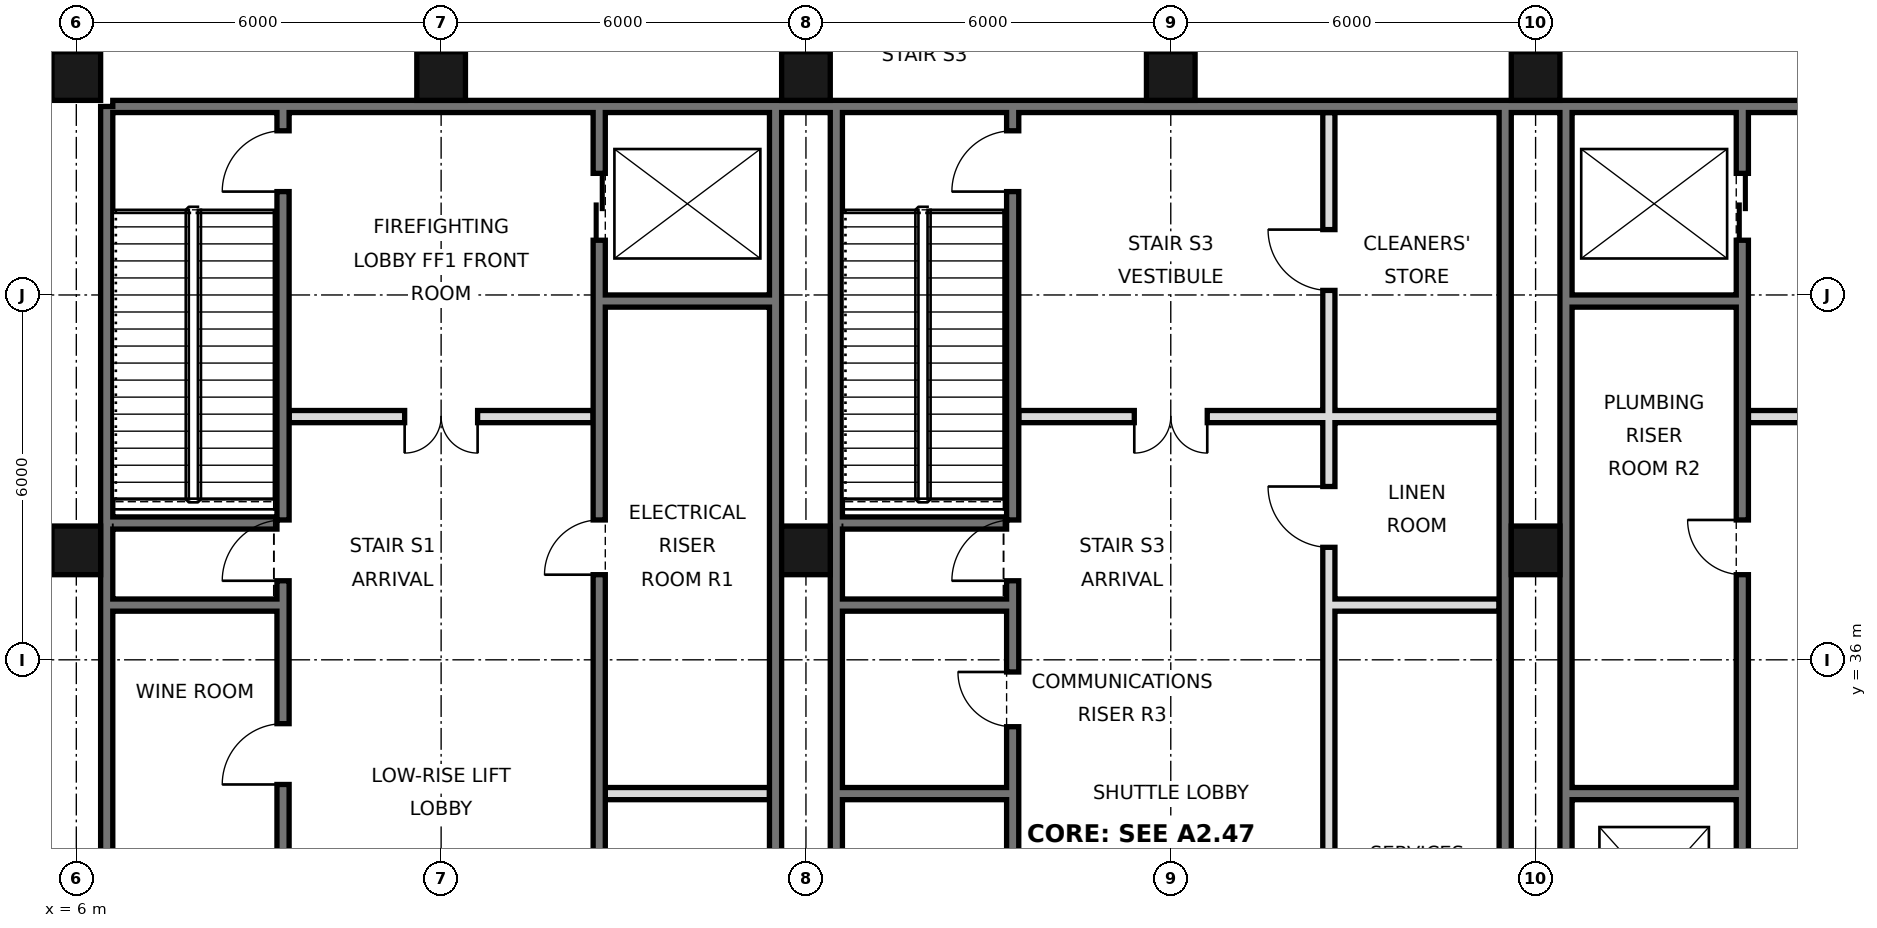
"""IFC4 building model, lengths in metres.
Left out: names, types, materials, properties, quantities, classifications, styles, units other than length and angle.
Written with IfcOpenShell. Run it as: python <this file> out.ifc"""

import sys

from ifc_helpers import new_model, si_unit, direction, frame, frame_2d, origin, origin_2d, place, context, subcontext, project, spatial, rectangle, hollow_rectangle, extrude, element, fill, save


model = new_model("IFC4")
c1 = context("Model", 3, precision=1e-05, world=origin(), true_north=direction((0.0, 1.0)))
c2 = subcontext(c1, "Body", "Model", "MODEL_VIEW")
j1 = project(units=[si_unit("LENGTHUNIT", "METRE"), si_unit("PLANEANGLEUNIT", "RADIAN")], contexts=[c1])
p1 = place(None, origin())
s1 = spatial("IfcSite", under=j1, at=p1, CompositionType="ELEMENT")
p2 = place(p1, origin())
s2 = spatial("IfcBuilding", under=s1, at=p2, CompositionType="ELEMENT")
p3 = place(p2, frame((0.0, 0.0, 186.0)))
s3 = spatial("IfcBuildingStorey", under=s2, at=p3, CompositionType="ELEMENT", Elevation=186.0)
for number, where, z_axis, x_axis in (
    (1, (6.0, 37.8, 0.0), (0.0, 0.0, 1.0), (1.0, 0.0, 0.0)),
    (2, (6.0, 45.6, 0.0), (0.0, 0.0, 1.0), (1.0, 0.0, 0.0)),
    (3, (12.0, 45.6, 0.0), (0.0, 0.0, 1.0), (1.0, 0.0, 0.0)),
    (4, (18.0, 37.8, 0.0), (0.0, 0.0, 1.0), (1.0, 0.0, 0.0)),
    (5, (18.0, 45.6, 0.0), (0.0, 0.0, 1.0), (1.0, 0.0, 0.0)),
    (6, (24.0, 45.6, 0.0), (0.0, 0.0, 1.0), (1.0, 0.0, 0.0)),
    (7, (30.0, 37.8, 0.0), (0.0, 0.0, 1.0), (1.0, 0.0, 0.0)),
    (8, (30.0, 45.6, 0.0), (0.0, 0.0, 1.0), (1.0, 0.0, 0.0)),
):
    element("IfcColumn", number, at=place(p3, frame(where, z_axis=z_axis, x_axis=x_axis)), inside=s3, PredefinedType="COLUMN", context=c2, shape_type="SweptSolid", body=[
        extrude(hollow_rectangle(XDim=0.8, YDim=0.8, WallThickness=0.045, at=origin_2d()), origin(), (0.0, 0.0, 1.0), 6.0),
    ])
p4 = place(p3, frame((6.5, 21.6, 0.0), z_axis=(0.0, 0.0, 1.0), x_axis=(0.0, 1.0, 0.0)))
e9 = element("IfcWall", 9, at=p4, inside=s3, PredefinedType="SOLIDWALL", context=c2, shape_type="SweptSolid", body=[
    extrude(rectangle(XDim=23.5, YDim=0.2, at=frame_2d((11.75, 0.0))), origin(), (0.0, 0.0, 1.0), 5.7),
])
p5 = place(p3, frame((6.6, 45.1, 0.0), z_axis=(0.0, 0.0, 1.0), x_axis=(1.0, 0.0, 0.0)))
e10 = element("IfcWall", 10, at=p5, inside=s3, PredefinedType="SOLIDWALL", context=c2, shape_type="SweptSolid", body=[
    extrude(rectangle(XDim=34.8, YDim=0.2, at=frame_2d((17.4, 0.0))), origin(), (0.0, 0.0, 1.0), 5.7),
])
for number, where, z_axis, x_axis in (
    (11, (17.5, 27.6, 0.0), (0.0, 0.0, 1.0), (0.0, 1.0, 0.0)),
    (12, (18.5, 27.6, 0.0), (0.0, 0.0, 1.0), (0.0, 1.0, 0.0)),
    (13, (29.5, 27.6, 0.0), (0.0, 0.0, 1.0), (0.0, 1.0, 0.0)),
    (14, (30.5, 27.6, 0.0), (0.0, 0.0, 1.0), (0.0, 1.0, 0.0)),
):
    element("IfcWall", number, at=place(p3, frame(where, z_axis=z_axis, x_axis=x_axis)), inside=s3, PredefinedType="SOLIDWALL", context=c2, shape_type="SweptSolid", body=[
        extrude(rectangle(XDim=17.5, YDim=0.2, at=frame_2d((8.75, 0.0))), origin(), (0.0, 0.0, 1.0), 5.7),
    ])
p6 = place(p3, frame((14.6, 27.5, 0.0), z_axis=(0.0, 0.0, 1.0), x_axis=(0.0, 1.0, 0.0)))
e15 = element("IfcWall", 15, at=p6, inside=s3, PredefinedType="SOLIDWALL", context=c2, shape_type="SweptSolid", body=[
    extrude(rectangle(XDim=17.5, YDim=0.2, at=frame_2d((8.75, 0.0))), origin(), (0.0, 0.0, 1.0), 5.7),
])
p7 = place(p6, frame((15.4, 0.0, 0.0)))
e16 = element("IfcOpeningElement", 16, at=p7, cuts=e15, PredefinedType="OPENING", context=c2, shape_type="SweptSolid", body=[
    extrude(rectangle(XDim=1.1, YDim=2.1, at=frame_2d((0.55, 1.05))), frame((0.0, 0.11, 0.0), z_axis=(0.0, -1.0, 0.0), x_axis=(1.0, 0.0, 0.0)), (0.0, 0.0, 1.0), 0.22),
])
p8 = place(p6, frame((2.7, 0.0, 0.0)))
e17 = element("IfcOpeningElement", 17, at=p8, cuts=e15, PredefinedType="OPENING", context=c2, shape_type="SweptSolid", body=[
    extrude(rectangle(XDim=1.0, YDim=2.1, at=frame_2d((0.5, 1.05))), frame((0.0, 0.11, 0.0), z_axis=(0.0, -1.0, 0.0), x_axis=(1.0, 0.0, 0.0)), (0.0, 0.0, 1.0), 0.22),
])
p9 = place(p6, frame((9.9, 0.0, 0.0)))
e18 = element("IfcOpeningElement", 18, at=p9, cuts=e15, PredefinedType="OPENING", context=c2, shape_type="SweptSolid", body=[
    extrude(rectangle(XDim=0.9, YDim=2.1, at=frame_2d((0.45, 1.05))), frame((0.0, 0.11, 0.0), z_axis=(0.0, -1.0, 0.0), x_axis=(1.0, 0.0, 0.0)), (0.0, 0.0, 1.0), 0.22),
])
p10 = place(p3, frame((21.4, 27.5, 0.0), z_axis=(0.0, 0.0, 1.0), x_axis=(0.0, 1.0, 0.0)))
e19 = element("IfcWall", 19, at=p10, inside=s3, PredefinedType="SOLIDWALL", context=c2, shape_type="SweptSolid", body=[
    extrude(rectangle(XDim=17.5, YDim=0.2, at=frame_2d((8.75, 0.0))), origin(), (0.0, 0.0, 1.0), 5.7),
])
p11 = place(p10, frame((9.8, 0.0, 0.0)))
e20 = element("IfcOpeningElement", 20, at=p11, cuts=e19, PredefinedType="OPENING", context=c2, shape_type="SweptSolid", body=[
    extrude(rectangle(XDim=1.0, YDim=2.1, at=frame_2d((0.5, 1.05))), frame((0.0, 0.11, 0.0), z_axis=(0.0, -1.0, 0.0), x_axis=(1.0, 0.0, 0.0)), (0.0, 0.0, 1.0), 0.22),
])
p12 = place(p10, frame((16.2, 0.0, 0.0)))
e21 = element("IfcOpeningElement", 21, at=p12, cuts=e19, PredefinedType="OPENING", context=c2, shape_type="SweptSolid", body=[
    extrude(rectangle(XDim=1.0, YDim=2.1, at=frame_2d((0.5, 1.05))), frame((0.0, 0.11, 0.0), z_axis=(0.0, -1.0, 0.0), x_axis=(1.0, 0.0, 0.0)), (0.0, 0.0, 1.0), 0.22),
])
p13 = place(p10, frame((7.4, 0.0, 0.0)))
e22 = element("IfcOpeningElement", 22, at=p13, cuts=e19, PredefinedType="OPENING", context=c2, shape_type="SweptSolid", body=[
    extrude(rectangle(XDim=0.9, YDim=2.1, at=frame_2d((0.45, 1.05))), frame((0.0, 0.11, 0.0), z_axis=(0.0, -1.0, 0.0), x_axis=(1.0, 0.0, 0.0)), (0.0, 0.0, 1.0), 0.22),
])
p14 = place(p3, frame((26.6, 27.5, 0.0), z_axis=(0.0, 0.0, 1.0), x_axis=(0.0, 1.0, 0.0)))
e23 = element("IfcWall", 23, at=p14, inside=s3, PredefinedType="SOLIDWALL", context=c2, shape_type="SweptSolid", body=[
    extrude(rectangle(XDim=17.5, YDim=0.2, at=frame_2d((8.75, 0.0))), origin(), (0.0, 0.0, 1.0), 5.7),
])
p15 = place(p14, frame((4.3, 0.0, 0.0)))
e24 = element("IfcOpeningElement", 24, at=p15, cuts=e23, PredefinedType="OPENING", context=c2, shape_type="SweptSolid", body=[
    extrude(rectangle(XDim=0.9, YDim=2.1, at=frame_2d((0.45, 1.05))), frame((0.0, 0.11, 0.0), z_axis=(0.0, -1.0, 0.0), x_axis=(1.0, 0.0, 0.0)), (0.0, 0.0, 1.0), 0.22),
])
p16 = place(p14, frame((10.35, 0.0, 0.0)))
e25 = element("IfcOpeningElement", 25, at=p16, cuts=e23, PredefinedType="OPENING", context=c2, shape_type="SweptSolid", body=[
    extrude(rectangle(XDim=1.0, YDim=2.1, at=frame_2d((0.5, 1.05))), frame((0.0, 0.11, 0.0), z_axis=(0.0, -1.0, 0.0), x_axis=(1.0, 0.0, 0.0)), (0.0, 0.0, 1.0), 0.22),
])
p17 = place(p14, frame((14.575, 0.0, 0.0)))
e26 = element("IfcOpeningElement", 26, at=p17, cuts=e23, PredefinedType="OPENING", context=c2, shape_type="SweptSolid", body=[
    extrude(rectangle(XDim=1.0, YDim=2.1, at=frame_2d((0.5, 1.05))), frame((0.0, 0.11, 0.0), z_axis=(0.0, -1.0, 0.0), x_axis=(1.0, 0.0, 0.0)), (0.0, 0.0, 1.0), 0.22),
])
p18 = place(p3, frame((33.4, 27.5, 0.0), z_axis=(0.0, 0.0, 1.0), x_axis=(0.0, 1.0, 0.0)))
e27 = element("IfcWall", 27, at=p18, inside=s3, PredefinedType="SOLIDWALL", context=c2, shape_type="SweptSolid", body=[
    extrude(rectangle(XDim=17.5, YDim=0.2, at=frame_2d((8.75, 0.0))), origin(), (0.0, 0.0, 1.0), 5.7),
])
p19 = place(p18, frame((1.1, 0.0, 0.0)))
e28 = element("IfcOpeningElement", 28, at=p19, cuts=e27, PredefinedType="OPENING", context=c2, shape_type="SweptSolid", body=[
    extrude(rectangle(XDim=1.1, YDim=2.1, at=frame_2d((0.55, 1.05))), frame((0.0, 0.11, 0.0), z_axis=(0.0, -1.0, 0.0), x_axis=(1.0, 0.0, 0.0)), (0.0, 0.0, 1.0), 0.22),
])
p20 = place(p18, frame((4.2, 0.0, 0.0)))
e29 = element("IfcOpeningElement", 29, at=p20, cuts=e27, PredefinedType="OPENING", context=c2, shape_type="SweptSolid", body=[
    extrude(rectangle(XDim=1.1, YDim=2.1, at=frame_2d((0.55, 1.05))), frame((0.0, 0.11, 0.0), z_axis=(0.0, -1.0, 0.0), x_axis=(1.0, 0.0, 0.0)), (0.0, 0.0, 1.0), 0.22),
])
p21 = place(p18, frame((15.4, 0.0, 0.0)))
e30 = element("IfcOpeningElement", 30, at=p21, cuts=e27, PredefinedType="OPENING", context=c2, shape_type="SweptSolid", body=[
    extrude(rectangle(XDim=1.1, YDim=2.1, at=frame_2d((0.55, 1.05))), frame((0.0, 0.11, 0.0), z_axis=(0.0, -1.0, 0.0), x_axis=(1.0, 0.0, 0.0)), (0.0, 0.0, 1.0), 0.22),
])
p22 = place(p18, frame((9.9, 0.0, 0.0)))
e31 = element("IfcOpeningElement", 31, at=p22, cuts=e27, PredefinedType="OPENING", context=c2, shape_type="SweptSolid", body=[
    extrude(rectangle(XDim=0.9, YDim=2.1, at=frame_2d((0.45, 1.05))), frame((0.0, 0.11, 0.0), z_axis=(0.0, -1.0, 0.0), x_axis=(1.0, 0.0, 0.0)), (0.0, 0.0, 1.0), 0.22),
])
p23 = place(p3, frame((9.4, 21.6, 0.0), z_axis=(0.0, 0.0, 1.0), x_axis=(0.0, 1.0, 0.0)))
e32 = element("IfcWall", 32, at=p23, inside=s3, PredefinedType="SOLIDWALL", context=c2, shape_type="SweptSolid", body=[
    extrude(rectangle(XDim=23.4, YDim=0.2, at=frame_2d((11.7, 0.0))), origin(), (0.0, 0.0, 1.0), 5.7),
])
p24 = place(p23, frame((7.7, 0.0, 0.0)))
e33 = element("IfcOpeningElement", 33, at=p24, cuts=e32, PredefinedType="OPENING", context=c2, shape_type="SweptSolid", body=[
    extrude(rectangle(XDim=1.0, YDim=2.1, at=frame_2d((0.5, 1.05))), frame((0.0, 0.11, 0.0), z_axis=(0.0, -1.0, 0.0), x_axis=(1.0, 0.0, 0.0)), (0.0, 0.0, 1.0), 0.22),
])
p25 = place(p23, frame((12.35, 0.0, 0.0)))
e34 = element("IfcOpeningElement", 34, at=p25, cuts=e32, PredefinedType="OPENING", context=c2, shape_type="SweptSolid", body=[
    extrude(rectangle(XDim=1.0, YDim=2.1, at=frame_2d((0.5, 1.05))), frame((0.0, 0.11, 0.0), z_axis=(0.0, -1.0, 0.0), x_axis=(1.0, 0.0, 0.0)), (0.0, 0.0, 1.0), 0.22),
])
p26 = place(p23, frame((15.7, 0.0, 0.0)))
e35 = element("IfcOpeningElement", 35, at=p26, cuts=e32, PredefinedType="OPENING", context=c2, shape_type="SweptSolid", body=[
    extrude(rectangle(XDim=1.0, YDim=2.1, at=frame_2d((0.5, 1.05))), frame((0.0, 0.11, 0.0), z_axis=(0.0, -1.0, 0.0), x_axis=(1.0, 0.0, 0.0)), (0.0, 0.0, 1.0), 0.22),
])
p27 = place(p23, frame((22.1, 0.0, 0.0)))
e36 = element("IfcOpeningElement", 36, at=p27, cuts=e32, PredefinedType="OPENING", context=c2, shape_type="SweptSolid", body=[
    extrude(rectangle(XDim=1.0, YDim=2.1, at=frame_2d((0.5, 1.05))), frame((0.0, 0.11, 0.0), z_axis=(0.0, -1.0, 0.0), x_axis=(1.0, 0.0, 0.0)), (0.0, 0.0, 1.0), 0.22),
])
p28 = place(p23, frame((0.175, 0.0, 0.0)))
e37 = element("IfcOpeningElement", 37, at=p28, cuts=e32, PredefinedType="OPENING", context=c2, shape_type="SweptSolid", body=[
    extrude(rectangle(XDim=0.9, YDim=2.1, at=frame_2d((0.45, 1.05))), frame((0.0, 0.11, 0.0), z_axis=(0.0, -1.0, 0.0), x_axis=(1.0, 0.0, 0.0)), (0.0, 0.0, 1.0), 0.22),
])
for number, where, z_axis, x_axis in (
    (38, (14.7, 33.8, 0.0), (0.0, 0.0, 1.0), (1.0, 0.0, 0.0)),
    (39, (18.6, 33.8, 0.0), (0.0, 0.0, 1.0), (1.0, 0.0, 0.0)),
    (40, (30.6, 33.8, 0.0), (0.0, 0.0, 1.0), (1.0, 0.0, 0.0)),
    (41, (18.6, 36.9, 0.0), (0.0, 0.0, 1.0), (1.0, 0.0, 0.0)),
    (42, (26.7, 36.9, 0.0), (0.0, 0.0, 1.0), (1.0, 0.0, 0.0)),
    (43, (6.6, 36.9, 0.0), (0.0, 0.0, 1.0), (1.0, 0.0, 0.0)),
):
    element("IfcWall", number, at=place(p3, frame(where, z_axis=z_axis, x_axis=x_axis)), inside=s3, PredefinedType="SOLIDWALL", context=c2, shape_type="SweptSolid", body=[
        extrude(rectangle(XDim=2.7, YDim=0.2, at=frame_2d((1.35, 0.0))), origin(), (0.0, 0.0, 1.0), 5.7),
    ])
for number, where, z_axis, x_axis in (
    (44, (18.6, 38.25, 0.0), (0.0, 0.0, 1.0), (1.0, 0.0, 0.0)),
    (45, (6.6, 38.25, 0.0), (0.0, 0.0, 1.0), (1.0, 0.0, 0.0)),
):
    element("IfcWall", number, at=place(p3, frame(where, z_axis=z_axis, x_axis=x_axis)), inside=s3, PredefinedType="SOLIDWALL", context=c2, shape_type="SweptSolid", body=[
        extrude(rectangle(XDim=2.7, YDim=0.2, at=frame_2d((1.35, 0.0))), origin(), (0.0, 0.0, 1.0), 2.8),
    ])
p29 = place(p3, frame((21.5, 40.0, 0.0), z_axis=(0.0, 0.0, 1.0), x_axis=(1.0, 0.0, 0.0)))
e46 = element("IfcWall", 46, at=p29, inside=s3, PredefinedType="PARTITIONING", context=c2, shape_type="SweptSolid", body=[
    extrude(rectangle(XDim=7.9, YDim=0.2, at=frame_2d((3.95, 0.0))), origin(), (0.0, 0.0, 1.0), 5.7),
])
p30 = place(p29, frame((1.9, 0.0, 0.0)))
e47 = element("IfcOpeningElement", 47, at=p30, cuts=e46, PredefinedType="OPENING", context=c2, shape_type="SweptSolid", body=[
    extrude(rectangle(XDim=1.2, YDim=2.1, at=frame_2d((0.6, 1.05))), frame((0.0, 0.11, 0.0), z_axis=(0.0, -1.0, 0.0), x_axis=(1.0, 0.0, 0.0)), (0.0, 0.0, 1.0), 0.22),
])
p31 = place(p3, frame((33.5, 40.0, 0.0), z_axis=(0.0, 0.0, 1.0), x_axis=(1.0, 0.0, 0.0)))
e48 = element("IfcWall", 48, at=p31, inside=s3, PredefinedType="PARTITIONING", context=c2, shape_type="SweptSolid", body=[
    extrude(rectangle(XDim=5.0, YDim=0.2, at=frame_2d((2.5, 0.0))), origin(), (0.0, 0.0, 1.0), 5.7),
])
p32 = place(p31, frame((1.9, 0.0, 0.0)))
e49 = element("IfcOpeningElement", 49, at=p32, cuts=e48, PredefinedType="OPENING", context=c2, shape_type="SweptSolid", body=[
    extrude(rectangle(XDim=1.2, YDim=2.1, at=frame_2d((0.6, 1.05))), frame((0.0, 0.11, 0.0), z_axis=(0.0, -1.0, 0.0), x_axis=(1.0, 0.0, 0.0)), (0.0, 0.0, 1.0), 0.22),
])
p33 = place(p3, frame((9.5, 40.0, 0.0), z_axis=(0.0, 0.0, 1.0), x_axis=(1.0, 0.0, 0.0)))
e50 = element("IfcWall", 50, at=p33, inside=s3, PredefinedType="PARTITIONING", context=c2, shape_type="SweptSolid", body=[
    extrude(rectangle(XDim=5.0, YDim=0.2, at=frame_2d((2.5, 0.0))), origin(), (0.0, 0.0, 1.0), 5.7),
])
p34 = place(p33, frame((1.9, 0.0, 0.0)))
e51 = element("IfcOpeningElement", 51, at=p34, cuts=e50, PredefinedType="OPENING", context=c2, shape_type="SweptSolid", body=[
    extrude(rectangle(XDim=1.2, YDim=2.1, at=frame_2d((0.6, 1.05))), frame((0.0, 0.11, 0.0), z_axis=(0.0, -1.0, 0.0), x_axis=(1.0, 0.0, 0.0)), (0.0, 0.0, 1.0), 0.22),
])
for number, where, z_axis, x_axis in (
    (52, (14.7, 41.9, 0.0), (0.0, 0.0, 1.0), (1.0, 0.0, 0.0)),
    (53, (30.6, 41.9, 0.0), (0.0, 0.0, 1.0), (1.0, 0.0, 0.0)),
):
    element("IfcWall", number, at=place(p3, frame(where, z_axis=z_axis, x_axis=x_axis)), inside=s3, PredefinedType="SOLIDWALL", context=c2, shape_type="SweptSolid", body=[
        extrude(rectangle(XDim=2.7, YDim=0.2, at=frame_2d((1.35, 0.0))), origin(), (0.0, 0.0, 1.0), 5.7),
    ])
p35 = place(p34, frame((1.2, 0.0, 0.0), z_axis=(0.0, 0.0, 1.0), x_axis=(-1.0, 0.0, 0.0)))
e54 = element("IfcDoor", 54, at=p35, inside=s3, OperationType="DOUBLE_DOOR_SINGLE_SWING", PredefinedType="DOOR", context=c2, shape_type="SweptSolid", body=[
    extrude(rectangle(XDim=1.2, YDim=2.1, at=frame_2d((0.6, 1.05))), frame((0.0, 0.025, 0.0), z_axis=(0.0, -1.0, 0.0), x_axis=(1.0, 0.0, 0.0)), (0.0, 0.0, 1.0), 0.05),
])
fill(e51, e54)
p36 = place(p30, frame((1.2, 0.0, 0.0), z_axis=(0.0, 0.0, 1.0), x_axis=(-1.0, 0.0, 0.0)))
e55 = element("IfcDoor", 55, at=p36, inside=s3, OperationType="DOUBLE_DOOR_SINGLE_SWING", PredefinedType="DOOR", context=c2, shape_type="SweptSolid", body=[
    extrude(rectangle(XDim=1.2, YDim=2.1, at=frame_2d((0.6, 1.05))), frame((0.0, 0.025, 0.0), z_axis=(0.0, -1.0, 0.0), x_axis=(1.0, 0.0, 0.0)), (0.0, 0.0, 1.0), 0.05),
])
fill(e47, e55)
p37 = place(p21, origin())
e56 = element("IfcDoor", 56, at=p37, inside=s3, OperationType="DOUBLE_DOOR_SLIDING", PredefinedType="DOOR", context=c2, shape_type="SweptSolid", body=[
    extrude(rectangle(XDim=1.1, YDim=2.1, at=frame_2d((0.55, 1.05))), frame((0.0, 0.025, 0.0), z_axis=(0.0, -1.0, 0.0), x_axis=(1.0, 0.0, 0.0)), (0.0, 0.0, 1.0), 0.05),
])
fill(e30, e56)
p38 = place(p7, origin())
e57 = element("IfcDoor", 57, at=p38, inside=s3, OperationType="DOUBLE_DOOR_SLIDING", PredefinedType="DOOR", context=c2, shape_type="SweptSolid", body=[
    extrude(rectangle(XDim=1.1, YDim=2.1, at=frame_2d((0.55, 1.05))), frame((0.0, 0.025, 0.0), z_axis=(0.0, -1.0, 0.0), x_axis=(1.0, 0.0, 0.0)), (0.0, 0.0, 1.0), 0.05),
])
fill(e16, e57)
p39 = place(p25, origin())
e58 = element("IfcDoor", 58, at=p39, inside=s3, OperationType="SINGLE_SWING_LEFT", PredefinedType="DOOR", context=c2, shape_type="SweptSolid", body=[
    extrude(rectangle(XDim=1.0, YDim=2.1, at=frame_2d((0.5, 1.05))), frame((0.0, 0.025, 0.0), z_axis=(0.0, -1.0, 0.0), x_axis=(1.0, 0.0, 0.0)), (0.0, 0.0, 1.0), 0.05),
])
fill(e34, e58)
p40 = place(p26, origin())
e59 = element("IfcDoor", 59, at=p40, inside=s3, OperationType="SINGLE_SWING_LEFT", PredefinedType="DOOR", context=c2, shape_type="SweptSolid", body=[
    extrude(rectangle(XDim=1.0, YDim=2.1, at=frame_2d((0.5, 1.05))), frame((0.0, 0.025, 0.0), z_axis=(0.0, -1.0, 0.0), x_axis=(1.0, 0.0, 0.0)), (0.0, 0.0, 1.0), 0.05),
])
fill(e35, e59)
p41 = place(p27, origin())
e60 = element("IfcDoor", 60, at=p41, inside=s3, OperationType="SINGLE_SWING_LEFT", PredefinedType="DOOR", context=c2, shape_type="SweptSolid", body=[
    extrude(rectangle(XDim=1.0, YDim=2.1, at=frame_2d((0.5, 1.05))), frame((0.0, 0.025, 0.0), z_axis=(0.0, -1.0, 0.0), x_axis=(1.0, 0.0, 0.0)), (0.0, 0.0, 1.0), 0.05),
])
fill(e36, e60)
p42 = place(p11, origin())
e61 = element("IfcDoor", 61, at=p42, inside=s3, OperationType="SINGLE_SWING_LEFT", PredefinedType="DOOR", context=c2, shape_type="SweptSolid", body=[
    extrude(rectangle(XDim=1.0, YDim=2.1, at=frame_2d((0.5, 1.05))), frame((0.0, 0.025, 0.0), z_axis=(0.0, -1.0, 0.0), x_axis=(1.0, 0.0, 0.0)), (0.0, 0.0, 1.0), 0.05),
])
fill(e20, e61)
p43 = place(p12, origin())
e62 = element("IfcDoor", 62, at=p43, inside=s3, OperationType="SINGLE_SWING_LEFT", PredefinedType="DOOR", context=c2, shape_type="SweptSolid", body=[
    extrude(rectangle(XDim=1.0, YDim=2.1, at=frame_2d((0.5, 1.05))), frame((0.0, 0.025, 0.0), z_axis=(0.0, -1.0, 0.0), x_axis=(1.0, 0.0, 0.0)), (0.0, 0.0, 1.0), 0.05),
])
fill(e21, e62)
p44 = place(p9, origin())
e63 = element("IfcDoor", 63, at=p44, inside=s3, OperationType="SINGLE_SWING_LEFT", PredefinedType="DOOR", context=c2, shape_type="SweptSolid", body=[
    extrude(rectangle(XDim=0.9, YDim=2.1, at=frame_2d((0.45, 1.05))), frame((0.0, 0.025, 0.0), z_axis=(0.0, -1.0, 0.0), x_axis=(1.0, 0.0, 0.0)), (0.0, 0.0, 1.0), 0.05),
])
fill(e18, e63)
p45 = place(p22, frame((0.9, 0.0, 0.0), z_axis=(0.0, 0.0, 1.0), x_axis=(-1.0, 0.0, 0.0)))
e64 = element("IfcDoor", 64, at=p45, inside=s3, OperationType="SINGLE_SWING_LEFT", PredefinedType="DOOR", context=c2, shape_type="SweptSolid", body=[
    extrude(rectangle(XDim=0.9, YDim=2.1, at=frame_2d((0.45, 1.05))), frame((0.0, 0.025, 0.0), z_axis=(0.0, -1.0, 0.0), x_axis=(1.0, 0.0, 0.0)), (0.0, 0.0, 1.0), 0.05),
])
fill(e31, e64)
p46 = place(p13, frame((0.9, 0.0, 0.0), z_axis=(0.0, 0.0, 1.0), x_axis=(-1.0, 0.0, 0.0)))
e65 = element("IfcDoor", 65, at=p46, inside=s3, OperationType="SINGLE_SWING_LEFT", PredefinedType="DOOR", context=c2, shape_type="SweptSolid", body=[
    extrude(rectangle(XDim=0.9, YDim=2.1, at=frame_2d((0.45, 1.05))), frame((0.0, 0.025, 0.0), z_axis=(0.0, -1.0, 0.0), x_axis=(1.0, 0.0, 0.0)), (0.0, 0.0, 1.0), 0.05),
])
fill(e22, e65)
p47 = place(p16, frame((1.0, 0.0, 0.0), z_axis=(0.0, 0.0, 1.0), x_axis=(-1.0, 0.0, 0.0)))
e66 = element("IfcDoor", 66, at=p47, inside=s3, OperationType="SINGLE_SWING_LEFT", PredefinedType="DOOR", context=c2, shape_type="SweptSolid", body=[
    extrude(rectangle(XDim=1.0, YDim=2.1, at=frame_2d((0.5, 1.05))), frame((0.0, 0.025, 0.0), z_axis=(0.0, -1.0, 0.0), x_axis=(1.0, 0.0, 0.0)), (0.0, 0.0, 1.0), 0.05),
])
fill(e25, e66)
p48 = place(p17, frame((1.0, 0.0, 0.0), z_axis=(0.0, 0.0, 1.0), x_axis=(-1.0, 0.0, 0.0)))
e67 = element("IfcDoor", 67, at=p48, inside=s3, OperationType="SINGLE_SWING_LEFT", PredefinedType="DOOR", context=c2, shape_type="SweptSolid", body=[
    extrude(rectangle(XDim=1.0, YDim=2.1, at=frame_2d((0.5, 1.05))), frame((0.0, 0.025, 0.0), z_axis=(0.0, -1.0, 0.0), x_axis=(1.0, 0.0, 0.0)), (0.0, 0.0, 1.0), 0.05),
])
fill(e26, e67)
save(model, sys.argv[1])
